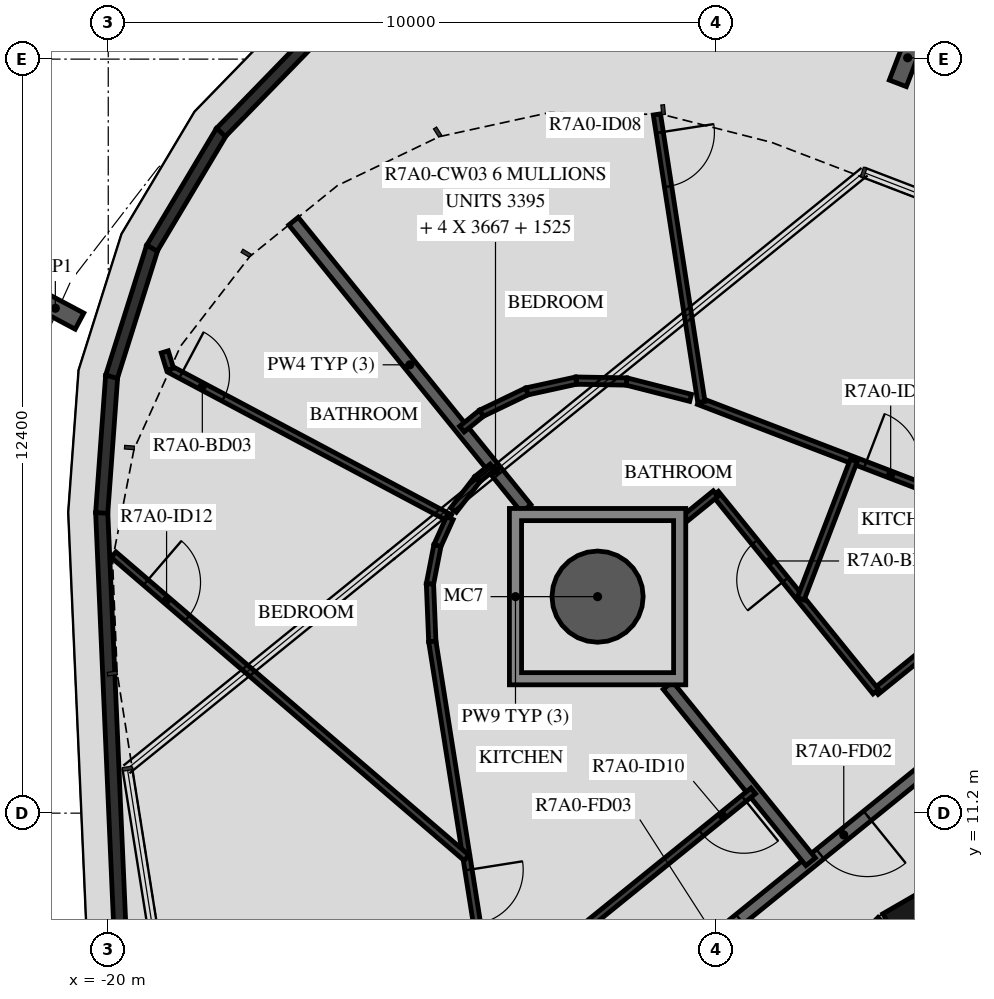
"""IFC4 building model, lengths in metres.
Left out: names, types, materials, properties, quantities, classifications, styles, units other than length and angle.
Written with IfcOpenShell. Run it as: python <this file> out.ifc"""

import sys

from ifc_helpers import new_model, si_unit, direction, frame, frame_2d, origin, origin_2d, place, context, subcontext, project, spatial, polyline, rectangle, hollow_circle, i_section, outline, extrude, element, fill, save


model = new_model("IFC4")
c1 = context("Model", 3, precision=1e-05, world=origin(), true_north=direction((0.0, 1.0)))
c2 = subcontext(c1, "Body", "Model", "MODEL_VIEW")
j1 = project(units=[si_unit("LENGTHUNIT", "METRE"), si_unit("PLANEANGLEUNIT", "RADIAN")], contexts=[c1])
p1 = place(None, origin())
s1 = spatial("IfcSite", under=j1, at=p1, CompositionType="ELEMENT")
p2 = place(p1, origin())
s2 = spatial("IfcBuilding", under=s1, at=p2, CompositionType="ELEMENT")
p3 = place(p2, frame((0.0, 0.0, 263.4)))
s3 = spatial("IfcBuildingStorey", under=s2, at=p3, CompositionType="ELEMENT", Elevation=263.4)
p4 = place(p3, frame((-11.953, 14.76, -0.45), z_axis=(0.0, 0.0, 1.0), x_axis=(1.0, 0.0, 0.0)))
e1 = element("IfcColumn", 1, at=p4, inside=s3, PredefinedType="COLUMN", context=c2, shape_type="SweptSolid", body=[
    extrude(hollow_circle(Radius=0.75, WallThickness=0.035, at=origin_2d()), origin(), (0.0, 0.0, 1.0), 3.57),
])
for number, where, z_axis, x_axis in (
    (2, (-6.854, 23.622, -0.45), (0.0, 0.0, 1.0), (0.934, -0.358, 0.0)),
    (3, (-20.87, 19.503, -0.45), (0.0, 0.0, 1.0), (0.47, 0.883, 0.0)),
):
    element("IfcColumn", number, at=place(p3, frame(where, z_axis=z_axis, x_axis=x_axis)), inside=s3, PredefinedType="COLUMN", context=c2, shape_type="SweptSolid", body=[
        extrude(i_section(OverallWidth=0.3, OverallDepth=0.9, WebThickness=0.019, FlangeThickness=0.035, FilletRadius=0.03, at=origin_2d()), origin(), (0.0, 0.0, 1.0), 3.57),
    ])
p5 = place(p3, frame((-18.624, -17.834, 0.03), z_axis=(0.0, 0.0, 1.0), x_axis=(-0.043617910627, 0.999048286057, 0.0)))
e4 = element("IfcWall", 4, at=p5, inside=s3, PredefinedType="PARAPET", context=c2, shape_type="SweptSolid", body=[
    extrude(rectangle(XDim=34.009, YDim=0.2, at=frame_2d((17.004, 0.0))), origin(), (0.0, 0.0, 1.0), 1.5),
])
p6 = place(p3, frame((-20.108, 16.137, 0.03), z_axis=(0.0, 0.0, 1.0), x_axis=(0.072676527807, 0.997355564634, 0.0)))
e5 = element("IfcWall", 5, at=p6, inside=s3, PredefinedType="PARAPET", context=c2, shape_type="SweptSolid", body=[
    extrude(rectangle(XDim=2.257, YDim=0.2, at=frame_2d((1.129, 0.0))), origin(), (0.0, 0.0, 1.0), 1.5),
])
for number, where, z_axis, x_axis in (
    (6, (-19.946, 18.377, 0.03), (0.0, 0.0, 1.0), (0.301, 0.954, 0.0)),
    (7, (-19.281, 20.492, 0.03), (0.0, 0.0, 1.0), (0.513, 0.859, 0.0)),
):
    element("IfcWall", number, at=place(p3, frame(where, z_axis=z_axis, x_axis=x_axis)), inside=s3, PredefinedType="PARAPET", context=c2, shape_type="SweptSolid", body=[
        extrude(rectangle(XDim=2.228, YDim=0.2, at=frame_2d((1.114, 0.0))), origin(), (0.0, 0.0, 1.0), 1.5),
    ])
p7 = place(p3, frame((-18.146, 22.396, 0.03), z_axis=(0.0, 0.0, 1.0), x_axis=(0.696732532768, 0.717331009913, 0.0)))
e8 = element("IfcWall", 8, at=p7, inside=s3, PredefinedType="PARAPET", context=c2, shape_type="SweptSolid", body=[
    extrude(rectangle(XDim=2.228, YDim=0.2, at=frame_2d((1.114, 0.0))), origin(), (0.0, 0.0, 1.0), 1.5),
])
p8 = place(p3, frame((-4.51, 10.845, 0.0), z_axis=(0.0, 0.0, 1.0), x_axis=(-0.865975092491, -0.500087131594, 0.0)))
e9 = element("IfcWall", 9, at=p8, inside=s3, PredefinedType="SHEAR", context=c2, shape_type="SweptSolid", body=[
    extrude(rectangle(XDim=3.033, YDim=0.5, at=frame_2d((1.516, 0.0))), origin(), (0.0, 0.0, 1.0), 3.12),
])
p9 = place(p3, frame((-7.164, 9.308, 0.0), z_axis=(0.0, 0.0, 1.0), x_axis=(-0.707106781187, -0.707106781187, 0.0)))
e10 = element("IfcWall", 10, at=p9, inside=s3, PredefinedType="SHEAR", context=c2, shape_type="SweptSolid", body=[
    extrude(rectangle(XDim=3.032, YDim=0.5, at=frame_2d((1.516, 0.0))), origin(), (0.0, 0.0, 1.0), 3.12),
])
p10 = place(p9, frame((1.416, 0.0, 0.0)))
e11 = element("IfcOpeningElement", 11, at=p10, cuts=e10, PredefinedType="OPENING", context=c2, shape_type="SweptSolid", body=[
    extrude(rectangle(XDim=1.2, YDim=2.1, at=frame_2d((0.6, 1.05))), frame((0.0, 0.26, 0.0), z_axis=(0.0, -1.0, 0.0), x_axis=(1.0, 0.0, 0.0)), (0.0, 0.0, 1.0), 0.52),
])
p11 = place(p3, frame((-5.643, 12.673, 0.0), z_axis=(0.0, 0.0, 1.0), x_axis=(-0.777160148113, -0.629302871585, 0.0)))
e12 = element("IfcWall", 12, at=p11, inside=s3, PredefinedType="STANDARD", context=c2, shape_type="SweptSolid", body=[
    extrude(rectangle(XDim=7.181, YDim=0.2, at=frame_2d((3.59, 0.0))), origin(), (0.0, 0.0, 1.0), 3.12),
])
p12 = place(p11, frame((2.41, 0.0, 0.0)))
e13 = element("IfcOpeningElement", 13, at=p12, cuts=e12, PredefinedType="OPENING", context=c2, shape_type="SweptSolid", body=[
    extrude(rectangle(XDim=1.0, YDim=2.1, at=frame_2d((0.5, 1.05))), frame((0.0, 0.11, 0.0), z_axis=(0.0, -1.0, 0.0), x_axis=(1.0, 0.0, 0.0)), (0.0, 0.0, 1.0), 0.22),
])
p13 = place(p11, frame((5.112, 0.0, 0.0)))
e14 = element("IfcOpeningElement", 14, at=p13, cuts=e12, PredefinedType="OPENING", context=c2, shape_type="SweptSolid", body=[
    extrude(rectangle(XDim=1.0, YDim=2.1, at=frame_2d((0.5, 1.05))), frame((0.0, 0.11, 0.0), z_axis=(0.0, -1.0, 0.0), x_axis=(1.0, 0.0, 0.0)), (0.0, 0.0, 1.0), 0.22),
])
p14 = place(p3, frame((-10.796, 13.299, 0.0), z_axis=(0.0, 0.0, 1.0), x_axis=(0.629290499381, -0.777170166301, 0.0)))
e15 = element("IfcWall", 15, at=p14, inside=s3, PredefinedType="STANDARD", context=c2, shape_type="SweptSolid", body=[
    extrude(rectangle(XDim=3.729, YDim=0.2, at=frame_2d((1.865, 0.0))), origin(), (0.0, 0.0, 1.0), 3.12),
])
p15 = place(p3, frame((-16.953, 20.936, 0.0), z_axis=(0.0, 0.0, 1.0), x_axis=(0.629331057166, -0.777137324085, 0.0)))
e16 = element("IfcWall", 16, at=p15, inside=s3, PredefinedType="STANDARD", context=c2, shape_type="SweptSolid", body=[
    extrude(rectangle(XDim=6.08, YDim=0.2, at=frame_2d((3.04, 0.0))), origin(), (0.0, 0.0, 1.0), 3.12),
])
p16 = place(p3, frame((-6.274, 14.092, 0.0), z_axis=(0.0, 0.0, 1.0), x_axis=(-0.777144673245, -0.629321981855, 0.0)))
e17 = element("IfcWall", 17, at=p16, inside=s3, PredefinedType="PARTITIONING", context=c2, shape_type="SweptSolid", body=[
    extrude(rectangle(XDim=1.419, YDim=0.12, at=frame_2d((0.709, 0.0))), origin(), (0.0, 0.0, 1.0), 3.12),
])
p17 = place(p3, frame((-7.377, 13.199, 0.0), z_axis=(0.0, 0.0, 1.0), x_axis=(-0.629382670352, 0.77709552454, 0.0)))
e18 = element("IfcWall", 18, at=p17, inside=s3, PredefinedType="PARTITIONING", context=c2, shape_type="SweptSolid", body=[
    extrude(rectangle(XDim=4.188, YDim=0.12, at=frame_2d((2.094, 0.0))), origin(), (0.0, 0.0, 1.0), 3.12),
])
p18 = place(p17, frame((2.364, 0.0, 0.0)))
e19 = element("IfcOpeningElement", 19, at=p18, cuts=e18, PredefinedType="OPENING", context=c2, shape_type="SweptSolid", body=[
    extrude(rectangle(XDim=0.8, YDim=2.1, at=frame_2d((0.4, 1.05))), frame((0.0, 0.07, 0.0), z_axis=(0.0, -1.0, 0.0), x_axis=(1.0, 0.0, 0.0)), (0.0, 0.0, 1.0), 0.14),
])
p19 = place(p3, frame((-10.013, 16.454, 0.0), z_axis=(0.0, 0.0, 1.0), x_axis=(-0.777001388062, -0.629498882406, 0.0)))
e20 = element("IfcWall", 20, at=p19, inside=s3, PredefinedType="PARTITIONING", context=c2, shape_type="SweptSolid", body=[
    extrude(rectangle(XDim=0.631, YDim=0.12, at=frame_2d((0.315, 0.0))), origin(), (0.0, 0.0, 1.0), 3.12),
])
p20 = place(p3, frame((-10.289, 17.978, 0.0), z_axis=(0.0, 0.0, 1.0), x_axis=(0.933579293595, -0.358370900844, 0.0)))
e21 = element("IfcWall", 21, at=p20, inside=s3, PredefinedType="PARTITIONING", context=c2, shape_type="SweptSolid", body=[
    extrude(rectangle(XDim=8.932, YDim=0.12, at=frame_2d((4.466, 0.0))), origin(), (0.0, 0.0, 1.0), 3.12),
])
p21 = place(p20, frame((2.93, 0.0, 0.0)))
e22 = element("IfcOpeningElement", 22, at=p21, cuts=e21, PredefinedType="OPENING", context=c2, shape_type="SweptSolid", body=[
    extrude(rectangle(XDim=0.9, YDim=2.1, at=frame_2d((0.45, 1.05))), frame((0.0, 0.07, 0.0), z_axis=(0.0, -1.0, 0.0), x_axis=(1.0, 0.0, 0.0)), (0.0, 0.0, 1.0), 0.14),
])
p22 = place(p3, frame((-10.977, 22.691, 0.0), z_axis=(0.0, 0.0, 1.0), x_axis=(0.152888983102, -0.988243370252, 0.0)))
e23 = element("IfcWall", 23, at=p22, inside=s3, PredefinedType="PARTITIONING", context=c2, shape_type="SweptSolid", body=[
    extrude(rectangle(XDim=4.786, YDim=0.12, at=frame_2d((2.393, 0.0))), origin(), (0.0, 0.0, 1.0), 3.12),
])
p23 = place(p22, frame((0.3, 0.0, 0.0)))
e24 = element("IfcOpeningElement", 24, at=p23, cuts=e23, PredefinedType="OPENING", context=c2, shape_type="SweptSolid", body=[
    extrude(rectangle(XDim=0.9, YDim=2.1, at=frame_2d((0.45, 1.05))), frame((0.0, 0.07, 0.0), z_axis=(0.0, -1.0, 0.0), x_axis=(1.0, 0.0, 0.0)), (0.0, 0.0, 1.0), 0.14),
])
p24 = place(p3, frame((-7.74, 17.0, 0.0), z_axis=(0.0, 0.0, 1.0), x_axis=(-0.358394723652, -0.93357014844, 0.0)))
e25 = element("IfcWall", 25, at=p24, inside=s3, PredefinedType="PARTITIONING", context=c2, shape_type="SweptSolid", body=[
    extrude(rectangle(XDim=2.436, YDim=0.12, at=frame_2d((1.218, 0.0))), origin(), (0.0, 0.0, 1.0), 3.12),
])
p25 = place(p3, frame((-10.424, 18.03, 0.0), z_axis=(0.0, 0.0, 1.0), x_axis=(-0.968874161395, 0.247553750489, 0.0)))
e26 = element("IfcWall", 26, at=p25, inside=s3, PredefinedType="PARTITIONING", context=c2, shape_type="SweptSolid", body=[
    extrude(rectangle(XDim=1.087, YDim=0.12, at=frame_2d((0.543, 0.0))), origin(), (0.0, 0.0, 1.0), 3.12),
])
p26 = place(p3, frame((-11.477, 18.299, 0.0), z_axis=(0.0, 0.0, 1.0), x_axis=(-0.999848939146, 0.017380992165, 0.0)))
e27 = element("IfcWall", 27, at=p26, inside=s3, PredefinedType="PARTITIONING", context=c2, shape_type="SweptSolid", body=[
    extrude(rectangle(XDim=0.829, YDim=0.12, at=frame_2d((0.415, 0.0))), origin(), (0.0, 0.0, 1.0), 3.12),
])
p27 = place(p3, frame((-12.305, 18.313, 0.0), z_axis=(0.0, 0.0, 1.0), x_axis=(-0.976949932909, -0.21346856581, 0.0)))
e28 = element("IfcWall", 28, at=p27, inside=s3, PredefinedType="PARTITIONING", context=c2, shape_type="SweptSolid", body=[
    extrude(rectangle(XDim=0.829, YDim=0.12, at=frame_2d((0.415, 0.0))), origin(), (0.0, 0.0, 1.0), 3.12),
])
p28 = place(p3, frame((-13.115, 18.136, 0.0), z_axis=(0.0, 0.0, 1.0), x_axis=(-0.901385111422, -0.43301833784, 0.0)))
e29 = element("IfcWall", 29, at=p28, inside=s3, PredefinedType="PARTITIONING", context=c2, shape_type="SweptSolid", body=[
    extrude(rectangle(XDim=0.829, YDim=0.12, at=frame_2d((0.415, 0.0))), origin(), (0.0, 0.0, 1.0), 3.12),
])
p29 = place(p3, frame((-13.862, 17.777, 0.0), z_axis=(0.0, 0.0, 1.0), x_axis=(-0.776888119785, -0.629638665694, 0.0)))
e30 = element("IfcWall", 30, at=p29, inside=s3, PredefinedType="PARTITIONING", context=c2, shape_type="SweptSolid", body=[
    extrude(rectangle(XDim=0.415, YDim=0.12, at=frame_2d((0.207, 0.0))), origin(), (0.0, 0.0, 1.0), 3.12),
])
p30 = place(p3, frame((-9.393, 11.566, 0.0), z_axis=(0.0, 0.0, 1.0), x_axis=(-0.777100258587, -0.629376825205, 0.0)))
e31 = element("IfcWall", 31, at=p30, inside=s3, PredefinedType="PARTITIONING", context=c2, shape_type="SweptSolid", body=[
    extrude(rectangle(XDim=3.971, YDim=0.12, at=frame_2d((1.986, 0.0))), origin(), (0.0, 0.0, 1.0), 3.12),
])
p31 = place(p30, frame((0.2, 0.0, 0.0)))
e32 = element("IfcOpeningElement", 32, at=p31, cuts=e31, PredefinedType="OPENING", context=c2, shape_type="SweptSolid", body=[
    extrude(rectangle(XDim=0.9, YDim=2.1, at=frame_2d((0.45, 1.05))), frame((0.0, 0.07, 0.0), z_axis=(0.0, -1.0, 0.0), x_axis=(1.0, 0.0, 0.0)), (0.0, 0.0, 1.0), 0.14),
])
p32 = place(p3, frame((-14.323, 16.184, 0.0), z_axis=(0.0, 0.0, 1.0), x_axis=(0.611198506308, 0.791477343887, 0.0)))
e33 = element("IfcWall", 33, at=p32, inside=s3, PredefinedType="PARTITIONING", context=c2, shape_type="SweptSolid", body=[
    extrude(rectangle(XDim=0.642, YDim=0.12, at=frame_2d((0.321, 0.0))), origin(), (0.0, 0.0, 1.0), 3.12),
])
p33 = place(p3, frame((-13.93, 16.692, 0.0), z_axis=(0.0, 0.0, 1.0), x_axis=(0.776695397137, 0.62987638475, 0.0)))
e34 = element("IfcWall", 34, at=p33, inside=s3, PredefinedType="PARTITIONING", context=c2, shape_type="SweptSolid", body=[
    extrude(rectangle(XDim=0.321, YDim=0.12, at=frame_2d((0.161, 0.0))), origin(), (0.0, 0.0, 1.0), 3.12),
])
p34 = place(p3, frame((-18.983, 18.499, 0.0), z_axis=(0.0, 0.0, 1.0), x_axis=(0.882948840489, -0.469469216328, 0.0)))
e35 = element("IfcWall", 35, at=p34, inside=s3, PredefinedType="PARTITIONING", context=c2, shape_type="SweptSolid", body=[
    extrude(rectangle(XDim=5.211, YDim=0.12, at=frame_2d((2.605, 0.0))), origin(), (0.0, 0.0, 1.0), 2.73),
])
p35 = place(p34, frame((0.2, 0.0, 0.0)))
e36 = element("IfcOpeningElement", 36, at=p35, cuts=e35, PredefinedType="OPENING", context=c2, shape_type="SweptSolid", body=[
    extrude(rectangle(XDim=0.8, YDim=2.1, at=frame_2d((0.4, 1.05))), frame((0.0, 0.07, 0.0), z_axis=(0.0, -1.0, 0.0), x_axis=(1.0, 0.0, 0.0)), (0.0, 0.0, 1.0), 0.14),
])
p36 = place(p3, frame((-14.382, 16.052, 0.0), z_axis=(0.0, 0.0, 1.0), x_axis=(-0.412099912529, -0.911138662385, 0.0)))
e37 = element("IfcWall", 37, at=p36, inside=s3, PredefinedType="PARTITIONING", context=c2, shape_type="SweptSolid", body=[
    extrude(rectangle(XDim=0.497, YDim=0.12, at=frame_2d((0.249, 0.0))), origin(), (0.0, 0.0, 1.0), 3.12),
])
p37 = place(p3, frame((-14.587, 15.6, 0.0), z_axis=(0.0, 0.0, 1.0), x_axis=(-0.190920556667, -0.98160549155, 0.0)))
e38 = element("IfcWall", 38, at=p37, inside=s3, PredefinedType="PARTITIONING", context=c2, shape_type="SweptSolid", body=[
    extrude(rectangle(XDim=0.642, YDim=0.12, at=frame_2d((0.321, 0.0))), origin(), (0.0, 0.0, 1.0), 3.12),
])
p38 = place(p3, frame((-14.709, 14.969, 0.0), z_axis=(0.0, 0.0, 1.0), x_axis=(0.040729848009, -0.999170195453, 0.0)))
e39 = element("IfcWall", 39, at=p38, inside=s3, PredefinedType="PARTITIONING", context=c2, shape_type="SweptSolid", body=[
    extrude(rectangle(XDim=0.947, YDim=0.12, at=frame_2d((0.474, 0.0))), origin(), (0.0, 0.0, 1.0), 3.12),
])
p39 = place(p3, frame((-14.671, 14.023, 0.0), z_axis=(0.0, 0.0, 1.0), x_axis=(0.156438190471, -0.987687750538, 0.0)))
e40 = element("IfcWall", 40, at=p39, inside=s3, PredefinedType="PARTITIONING", context=c2, shape_type="SweptSolid", body=[
    extrude(rectangle(XDim=7.644, YDim=0.12, at=frame_2d((3.822, 0.0))), origin(), (0.0, 0.0, 1.0), 3.12),
])
p40 = place(p39, frame((3.803, 0.0, 0.0)))
e41 = element("IfcOpeningElement", 41, at=p40, cuts=e40, PredefinedType="OPENING", context=c2, shape_type="SweptSolid", body=[
    extrude(rectangle(XDim=0.9, YDim=2.1, at=frame_2d((0.45, 1.05))), frame((0.0, 0.07, 0.0), z_axis=(0.0, -1.0, 0.0), x_axis=(1.0, 0.0, 0.0)), (0.0, 0.0, 1.0), 0.14),
])
p41 = place(p3, frame((-19.913, 15.451, 0.0), z_axis=(0.0, 0.0, 1.0), x_axis=(0.758623462992, -0.6515293097, 0.0)))
e42 = element("IfcWall", 42, at=p41, inside=s3, PredefinedType="PARTITIONING", context=c2, shape_type="SweptSolid", body=[
    extrude(rectangle(XDim=7.653, YDim=0.12, at=frame_2d((3.826, 0.0))), origin(), (0.0, 0.0, 1.0), 3.12),
])
p42 = place(p41, frame((0.7, 0.0, 0.0)))
e43 = element("IfcOpeningElement", 43, at=p42, cuts=e42, PredefinedType="OPENING", context=c2, shape_type="SweptSolid", body=[
    extrude(rectangle(XDim=0.9, YDim=2.1, at=frame_2d((0.45, 1.05))), frame((0.0, 0.07, 0.0), z_axis=(0.0, -1.0, 0.0), x_axis=(1.0, 0.0, 0.0)), (0.0, 0.0, 1.0), 0.14),
])
p43 = place(p3, frame((-18.983, 18.499, 0.0), z_axis=(0.0, 0.0, 1.0), x_axis=(-0.29197057896, 0.956427300437, 0.0)))
e44 = element("IfcWall", 44, at=p43, inside=s3, PredefinedType="PARTITIONING", context=c2, shape_type="SweptSolid", body=[
    extrude(rectangle(XDim=0.3, YDim=0.12, at=frame_2d((0.15, 0.0))), origin(), (0.0, 0.0, 1.0), 3.12),
])
p44 = place(p3, origin())
e45 = element("IfcWall", 45, at=p44, inside=s3, PredefinedType="STANDARD", context=c2, shape_type="SweptSolid", body=[
    extrude(outline(polyline([(-10.503, 16.21), (-10.503, 13.311), (-13.403, 13.311), (-13.403, 16.21), (-10.503, 16.21)]), holes=[polyline([(-13.203, 13.51), (-10.703, 13.51), (-10.703, 16.01), (-13.203, 16.01), (-13.203, 13.51)])]), origin(), (0.0, 0.0, 1.0), 3.12),
])
p45 = place(p12, origin())
e46 = element("IfcDoor", 46, at=p45, inside=s3, OperationType="SINGLE_SWING_RIGHT", PredefinedType="DOOR", context=c2, shape_type="SweptSolid", body=[
    extrude(rectangle(XDim=1.0, YDim=2.1, at=frame_2d((0.5, 1.05))), frame((0.0, 0.025, 0.0), z_axis=(0.0, -1.0, 0.0), x_axis=(1.0, 0.0, 0.0)), (0.0, 0.0, 1.0), 0.05),
])
fill(e13, e46)
p46 = place(p18, origin())
e47 = element("IfcDoor", 47, at=p46, inside=s3, OperationType="SINGLE_SWING_RIGHT", PredefinedType="DOOR", context=c2, shape_type="SweptSolid", body=[
    extrude(rectangle(XDim=0.8, YDim=2.1, at=frame_2d((0.4, 1.05))), frame((0.0, 0.025, 0.0), z_axis=(0.0, -1.0, 0.0), x_axis=(1.0, 0.0, 0.0)), (0.0, 0.0, 1.0), 0.05),
])
fill(e19, e47)
p47 = place(p23, origin())
e48 = element("IfcDoor", 48, at=p47, inside=s3, OperationType="SINGLE_SWING_RIGHT", PredefinedType="DOOR", context=c2, shape_type="SweptSolid", body=[
    extrude(rectangle(XDim=0.9, YDim=2.1, at=frame_2d((0.45, 1.05))), frame((0.0, 0.025, 0.0), z_axis=(0.0, -1.0, 0.0), x_axis=(1.0, 0.0, 0.0)), (0.0, 0.0, 1.0), 0.05),
])
fill(e24, e48)
p48 = place(p21, origin())
e49 = element("IfcDoor", 49, at=p48, inside=s3, OperationType="SINGLE_SWING_LEFT", PredefinedType="DOOR", context=c2, shape_type="SweptSolid", body=[
    extrude(rectangle(XDim=0.9, YDim=2.1, at=frame_2d((0.45, 1.05))), frame((0.0, 0.025, 0.0), z_axis=(0.0, -1.0, 0.0), x_axis=(1.0, 0.0, 0.0)), (0.0, 0.0, 1.0), 0.05),
])
fill(e22, e49)
p49 = place(p13, origin())
e50 = element("IfcDoor", 50, at=p49, inside=s3, OperationType="SINGLE_SWING_LEFT", PredefinedType="DOOR", context=c2, shape_type="SweptSolid", body=[
    extrude(rectangle(XDim=1.0, YDim=2.1, at=frame_2d((0.5, 1.05))), frame((0.0, 0.025, 0.0), z_axis=(0.0, -1.0, 0.0), x_axis=(1.0, 0.0, 0.0)), (0.0, 0.0, 1.0), 0.05),
])
fill(e14, e50)
p50 = place(p31, origin())
e51 = element("IfcDoor", 51, at=p50, inside=s3, OperationType="SINGLE_SWING_LEFT", PredefinedType="DOOR", context=c2, shape_type="SweptSolid", body=[
    extrude(rectangle(XDim=0.9, YDim=2.1, at=frame_2d((0.45, 1.05))), frame((0.0, 0.025, 0.0), z_axis=(0.0, -1.0, 0.0), x_axis=(1.0, 0.0, 0.0)), (0.0, 0.0, 1.0), 0.05),
])
fill(e32, e51)
p51 = place(p42, origin())
e52 = element("IfcDoor", 52, at=p51, inside=s3, OperationType="SINGLE_SWING_LEFT", PredefinedType="DOOR", context=c2, shape_type="SweptSolid", body=[
    extrude(rectangle(XDim=0.9, YDim=2.1, at=frame_2d((0.45, 1.05))), frame((0.0, 0.025, 0.0), z_axis=(0.0, -1.0, 0.0), x_axis=(1.0, 0.0, 0.0)), (0.0, 0.0, 1.0), 0.05),
])
fill(e43, e52)
p52 = place(p35, origin())
e53 = element("IfcDoor", 53, at=p52, inside=s3, OperationType="SINGLE_SWING_LEFT", PredefinedType="DOOR", context=c2, shape_type="SweptSolid", body=[
    extrude(rectangle(XDim=0.8, YDim=2.1, at=frame_2d((0.4, 1.05))), frame((0.0, 0.025, 0.0), z_axis=(0.0, -1.0, 0.0), x_axis=(1.0, 0.0, 0.0)), (0.0, 0.0, 1.0), 0.05),
])
fill(e36, e53)
p53 = place(p40, origin())
e54 = element("IfcDoor", 54, at=p53, inside=s3, OperationType="SINGLE_SWING_RIGHT", PredefinedType="DOOR", context=c2, shape_type="SweptSolid", body=[
    extrude(rectangle(XDim=0.9, YDim=2.1, at=frame_2d((0.45, 1.05))), frame((0.0, 0.025, 0.0), z_axis=(0.0, -1.0, 0.0), x_axis=(1.0, 0.0, 0.0)), (0.0, 0.0, 1.0), 0.05),
])
fill(e41, e54)
save(model, sys.argv[1])
